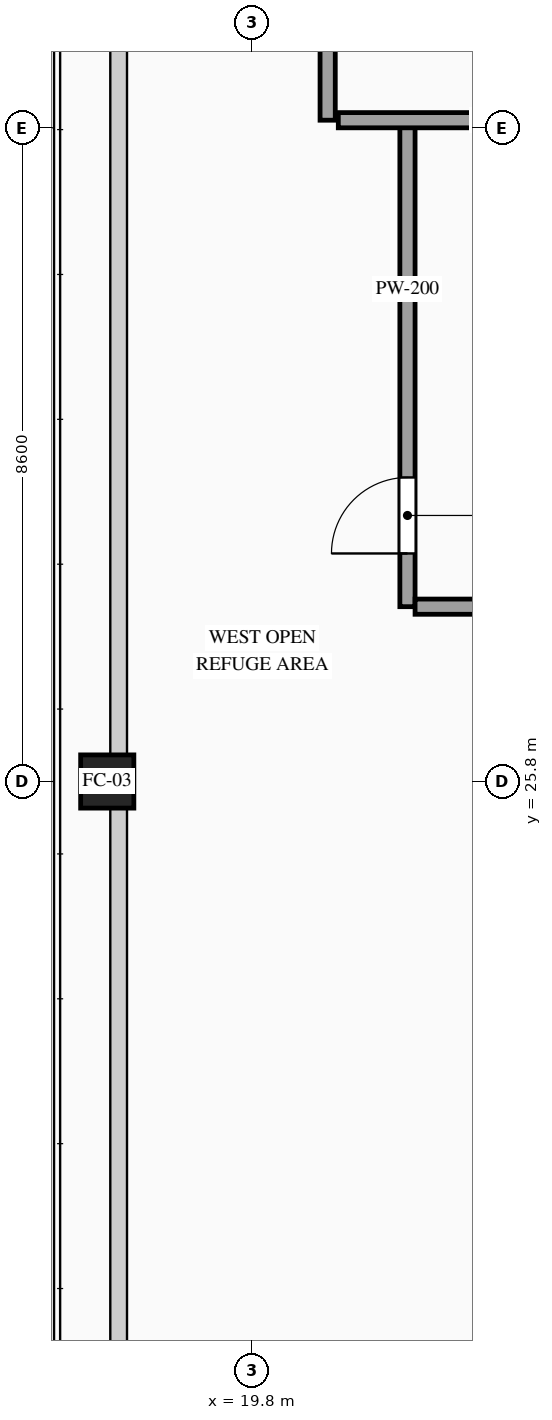
"""IFC4 building model, lengths in metres.
Left out: names, types, materials, properties, quantities, classifications, styles, units other than length and angle.
Written with IfcOpenShell. Run it as: python <this file> out.ifc"""

import sys

from ifc_helpers import new_model, si_unit, direction, frame, frame_2d, origin, origin_2d, place, context, subcontext, project, spatial, rectangle, hollow_rectangle, extrude, source, transform, mapped, element, fill, save


model = new_model("IFC4")
c1 = context("Model", 3, precision=1e-05, world=origin(), true_north=direction((0.0, 1.0)))
c2 = subcontext(c1, "Body", "Model", "MODEL_VIEW")
j1 = project(units=[si_unit("LENGTHUNIT", "METRE"), si_unit("PLANEANGLEUNIT", "RADIAN")], contexts=[c1])
p1 = place(None, origin())
s1 = spatial("IfcSite", under=j1, at=p1, CompositionType="ELEMENT")
p2 = place(p1, origin())
s2 = spatial("IfcBuilding", under=s1, at=p2, CompositionType="ELEMENT")
p3 = place(p2, frame((0.0, 0.0, 306.6)))
s3 = spatial("IfcBuildingStorey", under=s2, at=p3, CompositionType="ELEMENT", Elevation=306.6)
m1 = source(origin(), c2, "Body", "SweptSolid", [
    extrude(hollow_rectangle(XDim=0.7, YDim=0.7, WallThickness=0.032, at=origin_2d()), origin(), (0.0, 0.0, 1.0), 4.6),
])
p4 = place(p3, frame((17.9, 25.8, 0.0), z_axis=(0.0, 0.0, 1.0), x_axis=(1.0, 0.0, 0.0)))
e1 = element("IfcColumn", 1, at=p4, inside=s3, PredefinedType="COLUMN", context=c2, shape_type="MappedRepresentation", body=[
    mapped(m1, transform((0.0, 0.0, 0.0), scale=1.0)),
])
m2 = source(origin(), c2, "Body", "SweptSolid", [
    extrude(rectangle(XDim=10.1, YDim=0.2, at=frame_2d((5.05, 0.0))), origin(), (0.0, 0.0, 1.0), 4.38),
])
p5 = place(p3, frame((20.8, 34.5, 0.0), z_axis=(0.0, 0.0, 1.0), x_axis=(0.0, 1.0, 0.0)))
e2 = element("IfcWall", 2, at=p5, inside=s3, PredefinedType="PARTITIONING", context=c2, shape_type="MappedRepresentation", body=[
    mapped(m2, transform((0.0, 0.0, 0.0), scale=1.0)),
])
p6 = place(p3, frame((21.85, 28.1, 0.0), z_axis=(0.0, 0.0, 1.0), x_axis=(0.0, 1.0, 0.0)))
e3 = element("IfcWall", 3, at=p6, inside=s3, PredefinedType="PARTITIONING", context=c2, shape_type="SweptSolid", body=[
    extrude(rectangle(XDim=6.4, YDim=0.2, at=frame_2d((3.2, 0.0))), origin(), (0.0, 0.0, 1.0), 4.38),
])
p7 = place(p6, frame((0.7, 0.0, 0.0)))
e4 = element("IfcOpeningElement", 4, at=p7, cuts=e3, PredefinedType="OPENING", context=c2, shape_type="SweptSolid", body=[
    extrude(rectangle(XDim=1.0, YDim=2.2, at=frame_2d((0.5, 1.1))), frame((0.0, 0.115, 0.0), z_axis=(0.0, -1.0, 0.0), x_axis=(1.0, 0.0, 0.0)), (0.0, 0.0, 1.0), 0.23),
])
m3 = source(origin(), c2, "Body", "SweptSolid", [
    extrude(rectangle(XDim=1.59, YDim=0.2, at=frame_2d((0.795, 0.0))), origin(), (0.0, 0.0, 1.0), 4.38),
])
p8 = place(p3, frame((21.95, 28.1, 0.0), z_axis=(0.0, 0.0, 1.0), x_axis=(1.0, 0.0, 0.0)))
e5 = element("IfcWall", 5, at=p8, inside=s3, PredefinedType="PARTITIONING", context=c2, shape_type="MappedRepresentation", body=[
    mapped(m3, transform((0.0, 0.0, 0.0), scale=1.0)),
])
p9 = place(p3, frame((20.94, 34.5, 0.0), z_axis=(0.0, 0.0, 1.0), x_axis=(1.0, 0.0, 0.0)))
e6 = element("IfcWall", 6, at=p9, inside=s3, PredefinedType="PARTITIONING", context=c2, shape_type="SweptSolid", body=[
    extrude(rectangle(XDim=8.351, YDim=0.2, at=frame_2d((4.176, 0.0))), origin(), (0.0, 0.0, 1.0), 4.38),
])
p10 = place(p9, frame((4.61, 0.0, 0.0)))
e7 = element("IfcOpeningElement", 7, at=p10, cuts=e6, PredefinedType="OPENING", context=c2, shape_type="SweptSolid", body=[
    extrude(rectangle(XDim=1.5, YDim=2.3, at=frame_2d((0.75, 1.15))), frame((0.0, 0.115, 0.0), z_axis=(0.0, -1.0, 0.0), x_axis=(1.0, 0.0, 0.0)), (0.0, 0.0, 1.0), 0.23),
])
m4 = source(origin(), c2, "Body", "SweptSolid", [
    extrude(rectangle(XDim=1.0, YDim=2.2, at=frame_2d((0.5, 1.1))), frame((0.0, 0.025, 0.0), z_axis=(0.0, -1.0, 0.0), x_axis=(1.0, 0.0, 0.0)), (0.0, 0.0, 1.0), 0.05),
])
p11 = place(p7, origin())
e8 = element("IfcDoor", 8, at=p11, inside=s3, OperationType="SINGLE_SWING_LEFT", PredefinedType="DOOR", context=c2, shape_type="MappedRepresentation", body=[
    mapped(m4, transform((0.0, 0.0, 0.0), scale=1.0)),
])
fill(e4, e8)
save(model, sys.argv[1])
